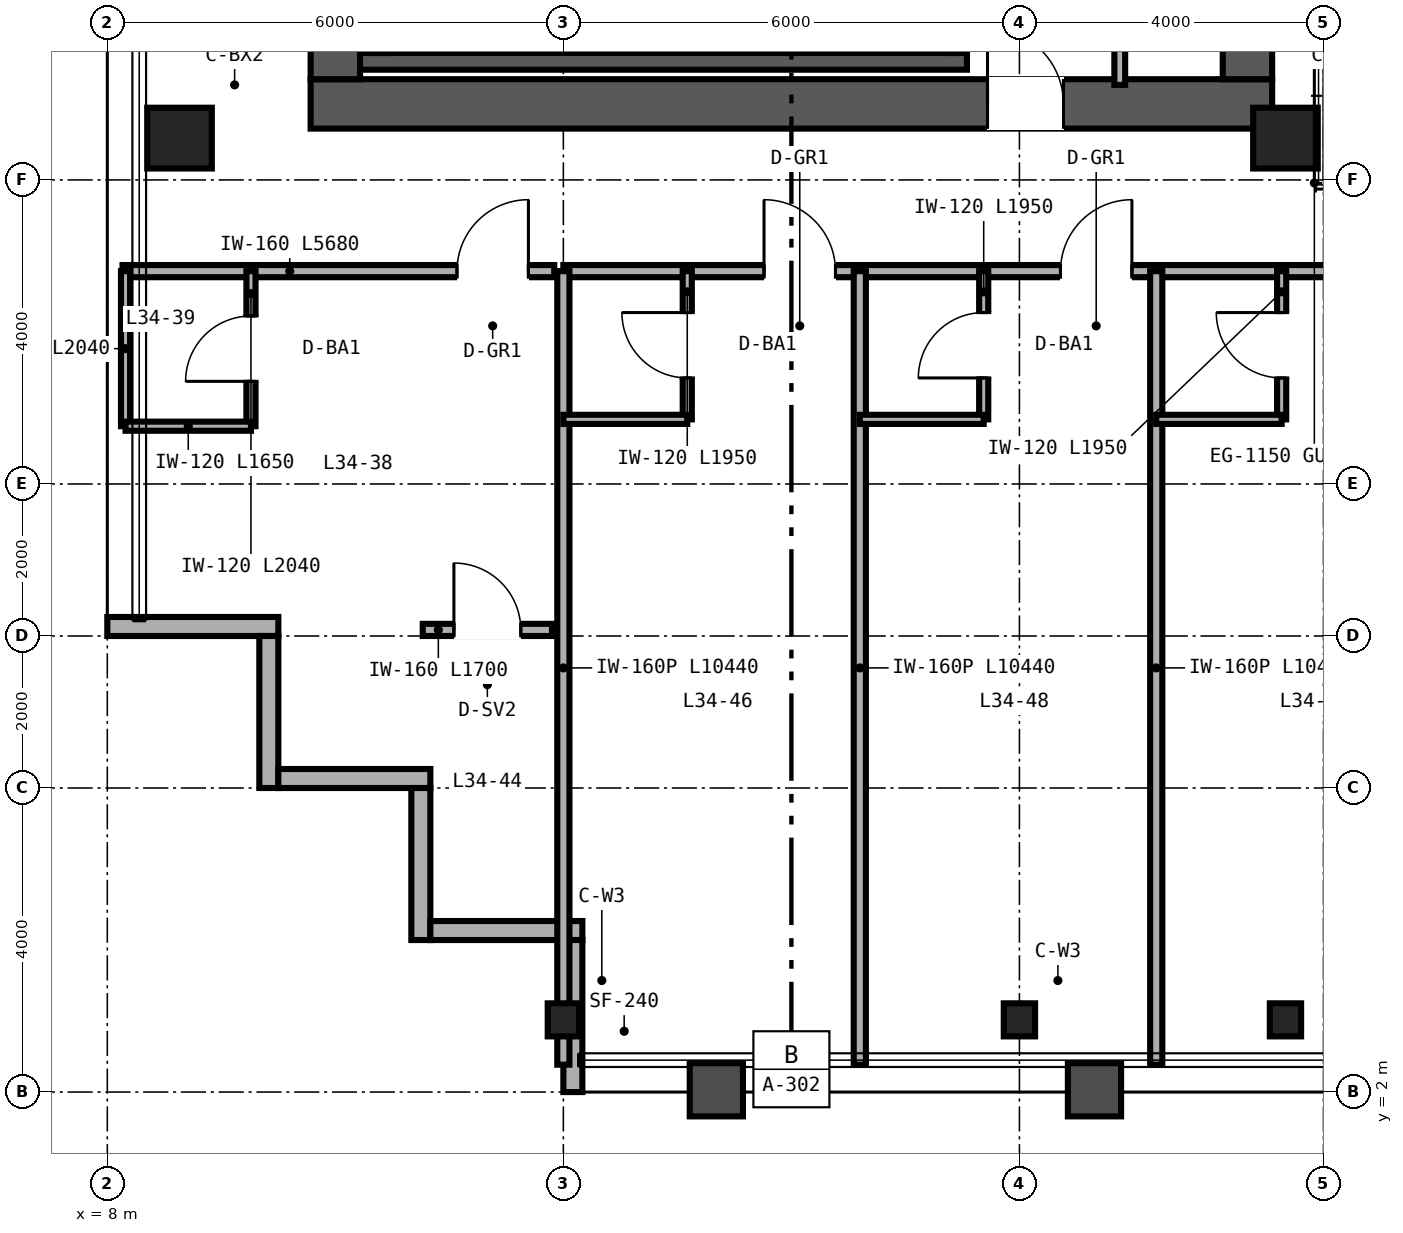
"""IFC4 building model, lengths in metres.
Left out: names, types, materials, properties, quantities, classifications, styles, units other than length and angle.
Written with IfcOpenShell. Run it as: python <this file> out.ifc"""

import sys

from ifc_helpers import new_model, si_unit, direction, frame, frame_2d, origin, origin_2d, place, context, subcontext, project, spatial, rectangle, hollow_rectangle, i_section, extrude, source, transform, mapped, element, fill, save


model = new_model("IFC4")
c1 = context("Model", 3, precision=1e-05, world=origin(), true_north=direction((0.0, 1.0)))
c2 = subcontext(c1, "Body", "Model", "MODEL_VIEW")
j1 = project(units=[si_unit("LENGTHUNIT", "METRE"), si_unit("PLANEANGLEUNIT", "RADIAN")], contexts=[c1])
p1 = place(None, origin())
s1 = spatial("IfcSite", under=j1, at=p1, CompositionType="ELEMENT")
p2 = place(p1, origin())
s2 = spatial("IfcBuilding", under=s1, at=p2, CompositionType="ELEMENT")
p3 = place(p2, frame((0.0, 0.0, 136.8)))
s3 = spatial("IfcBuildingStorey", under=s2, at=p3, CompositionType="ELEMENT", Elevation=136.8)
p4 = place(p3, frame((10.675, 15.0, 0.0), z_axis=(0.0, 0.0, 1.0), x_axis=(1.0, 0.0, 0.0)))
e1 = element("IfcWall", 1, at=p4, inside=s3, PredefinedType="SHEAR", context=c2, shape_type="SweptSolid", body=[
    extrude(rectangle(XDim=12.65, YDim=0.65, at=frame_2d((6.325, 0.0))), origin(), (0.0, 0.0, 1.0), 3.36),
])
p5 = place(p4, frame((8.905, 0.0, 0.0)))
e2 = element("IfcOpeningElement", 2, at=p5, cuts=e1, PredefinedType="OPENING", context=c2, shape_type="SweptSolid", body=[
    extrude(rectangle(XDim=1.0, YDim=2.15, at=frame_2d((0.5, 1.075))), frame((0.0, 0.335, 0.0), z_axis=(0.0, -1.0, 0.0), x_axis=(1.0, 0.0, 0.0)), (0.0, 0.0, 1.0), 0.67),
])
for number, where, z_axis, x_axis in (
    (3, (11.0, 15.325, 0.0), (0.0, 0.0, 1.0), (0.0, 1.0, 0.0)),
    (4, (23.0, 15.325, 0.0), (0.0, 0.0, 1.0), (0.0, 1.0, 0.0)),
):
    element("IfcWall", number, at=place(p3, frame(where, z_axis=z_axis, x_axis=x_axis)), inside=s3, PredefinedType="SHEAR", context=c2, shape_type="SweptSolid", body=[
        extrude(rectangle(XDim=21.35, YDim=0.65, at=frame_2d((10.675, 0.0))), origin(), (0.0, 0.0, 1.0), 3.36),
    ])
p6 = place(p3, frame((11.325, 15.56, 0.0), z_axis=(0.0, 0.0, 1.0), x_axis=(1.0, 0.0, 0.0)))
e5 = element("IfcWall", 5, at=p6, inside=s3, PredefinedType="SHEAR", context=c2, shape_type="SweptSolid", body=[
    extrude(rectangle(XDim=7.985, YDim=0.22, at=frame_2d((3.993, 0.0))), origin(), (0.0, 0.0, 1.0), 3.4),
])
for number, where, z_axis, x_axis in (
    (6, (11.56, 15.67, 0.0), (0.0, 0.0, 1.0), (0.0, 1.0, 0.0)),
    (7, (19.2, 15.67, 0.0), (0.0, 0.0, 1.0), (0.0, 1.0, 0.0)),
):
    element("IfcWall", number, at=place(p3, frame(where, z_axis=z_axis, x_axis=x_axis)), inside=s3, PredefinedType="SHEAR", context=c2, shape_type="SweptSolid", body=[
        extrude(rectangle(XDim=3.28, YDim=0.22, at=frame_2d((1.64, 0.0))), origin(), (0.0, 0.0, 1.0), 3.4),
    ])
m1 = source(origin(), c2, "Body", "SweptSolid", [
    extrude(hollow_rectangle(XDim=0.85, YDim=0.8, WallThickness=0.032, at=origin_2d()), origin(), (0.0, 0.0, 1.0), 3.36),
])
for number, where, z_axis, x_axis in (
    (8, (8.95, 14.55, 0.0), (0.0, 0.0, 1.0), (1.0, 0.0, 0.0)),
    (9, (23.5, 14.55, 0.0), (0.0, 0.0, 1.0), (1.0, 0.0, 0.0)),
):
    element("IfcColumn", number, at=place(p3, frame(where, z_axis=z_axis, x_axis=x_axis)), inside=s3, PredefinedType="COLUMN", context=c2, shape_type="MappedRepresentation", body=[
        mapped(m1, transform((0.0, 0.0, 0.0), scale=1.0)),
    ])
m2 = source(origin(), c2, "Body", "SweptSolid", [
    extrude(i_section(OverallWidth=0.412, OverallDepth=0.435, WebThickness=0.036, FlangeThickness=0.057, FilletRadius=0.025, at=origin_2d()), origin(), (0.0, 0.0, 1.0), 3.36),
])
for number, where, z_axis, x_axis in (
    (10, (14.0, 2.95, 0.0), (0.0, 0.0, 1.0), (1.0, 0.0, 0.0)),
    (11, (20.0, 2.95, 0.0), (0.0, 0.0, 1.0), (1.0, 0.0, 0.0)),
    (12, (23.5, 2.95, 0.0), (0.0, 0.0, 1.0), (1.0, 0.0, 0.0)),
):
    element("IfcColumn", number, at=place(p3, frame(where, z_axis=z_axis, x_axis=x_axis)), inside=s3, PredefinedType="COLUMN", context=c2, shape_type="MappedRepresentation", body=[
        mapped(m2, transform((0.0, 0.0, 0.0), scale=1.0)),
    ])
p7 = place(p3, frame((8.0, 8.125, 0.0), z_axis=(0.0, 0.0, 1.0), x_axis=(1.0, 0.0, 0.0)))
e13 = element("IfcWall", 13, at=p7, inside=s3, PredefinedType="SOLIDWALL", context=c2, shape_type="SweptSolid", body=[
    extrude(rectangle(XDim=2.25, YDim=0.25, at=frame_2d((1.125, 0.0))), origin(), (0.0, 0.0, 1.0), 3.36),
])
for number, where, z_axis, x_axis in (
    (14, (10.125, 8.0, 0.0), (0.0, 0.0, 1.0), (0.0, -1.0, 0.0)),
    (15, (10.25, 6.125, 0.0), (0.0, 0.0, 1.0), (1.0, 0.0, 0.0)),
    (16, (12.125, 6.0, 0.0), (0.0, 0.0, 1.0), (0.0, -1.0, 0.0)),
    (17, (12.25, 4.125, 0.0), (0.0, 0.0, 1.0), (1.0, 0.0, 0.0)),
):
    element("IfcWall", number, at=place(p3, frame(where, z_axis=z_axis, x_axis=x_axis)), inside=s3, PredefinedType="SOLIDWALL", context=c2, shape_type="SweptSolid", body=[
        extrude(rectangle(XDim=2.0, YDim=0.25, at=frame_2d((1.0, 0.0))), origin(), (0.0, 0.0, 1.0), 3.36),
    ])
p8 = place(p3, frame((14.125, 4.0, 0.0), z_axis=(0.0, 0.0, 1.0), x_axis=(0.0, -1.0, 0.0)))
e18 = element("IfcWall", 18, at=p8, inside=s3, PredefinedType="SOLIDWALL", context=c2, shape_type="SweptSolid", body=[
    extrude(rectangle(XDim=2.0, YDim=0.25, at=frame_2d((1.0, 0.0))), origin(), (0.0, 0.0, 1.0), 2.667),
])
p9 = place(p3, frame((21.32, 15.25, 0.0), z_axis=(0.0, 0.0, 1.0), x_axis=(0.0, 1.0, 0.0)))
e19 = element("IfcWall", 19, at=p9, inside=s3, PredefinedType="PARTITIONING", context=c2, shape_type="SweptSolid", body=[
    extrude(rectangle(XDim=3.59, YDim=0.142, at=frame_2d((1.795, 0.0))), origin(), (0.0, 0.0, 1.0), 3.36),
])
p10 = place(p9, frame((1.25, 0.0, 0.0)))
e20 = element("IfcOpeningElement", 20, at=p10, cuts=e19, PredefinedType="OPENING", context=c2, shape_type="SweptSolid", body=[
    extrude(rectangle(XDim=0.84, YDim=2.1, at=frame_2d((0.42, 1.05))), frame((0.0, 0.081, 0.0), z_axis=(0.0, -1.0, 0.0), x_axis=(1.0, 0.0, 0.0)), (0.0, 0.0, 1.0), 0.162),
])
p11 = place(p3, frame((8.2, 12.8, 0.0), z_axis=(0.0, 0.0, 1.0), x_axis=(1.0, 0.0, 0.0)))
e21 = element("IfcWall", 21, at=p11, inside=s3, PredefinedType="PARTITIONING", context=c2, shape_type="SweptSolid", body=[
    extrude(rectangle(XDim=5.68, YDim=0.16, at=frame_2d((2.84, 0.0))), origin(), (0.0, 0.0, 1.0), 3.36),
])
p12 = place(p11, frame((4.4, 0.0, 0.0)))
e22 = element("IfcOpeningElement", 22, at=p12, cuts=e21, PredefinedType="OPENING", context=c2, shape_type="SweptSolid", body=[
    extrude(rectangle(XDim=0.94, YDim=2.15, at=frame_2d((0.47, 1.075))), frame((0.0, 0.09, 0.0), z_axis=(0.0, -1.0, 0.0), x_axis=(1.0, 0.0, 0.0)), (0.0, 0.0, 1.0), 0.18),
])
p13 = place(p3, frame((9.89, 10.76, 0.0), z_axis=(0.0, 0.0, 1.0), x_axis=(0.0, 1.0, 0.0)))
e23 = element("IfcWall", 23, at=p13, inside=s3, PredefinedType="PARTITIONING", context=c2, shape_type="SweptSolid", body=[
    extrude(rectangle(XDim=2.04, YDim=0.12, at=frame_2d((1.02, 0.0))), origin(), (0.0, 0.0, 1.0), 3.36),
])
p14 = place(p13, frame((0.59, 0.0, 0.0)))
e24 = element("IfcOpeningElement", 24, at=p14, cuts=e23, PredefinedType="OPENING", context=c2, shape_type="SweptSolid", body=[
    extrude(rectangle(XDim=0.86, YDim=2.1, at=frame_2d((0.43, 1.05))), frame((0.0, 0.07, 0.0), z_axis=(0.0, -1.0, 0.0), x_axis=(1.0, 0.0, 0.0)), (0.0, 0.0, 1.0), 0.14),
])
p15 = place(p3, frame((8.24, 10.76, 0.0), z_axis=(0.0, 0.0, 1.0), x_axis=(0.0, 1.0, 0.0)))
e25 = element("IfcWall", 25, at=p15, inside=s3, PredefinedType="PARTITIONING", context=c2, shape_type="SweptSolid", body=[
    extrude(rectangle(XDim=2.04, YDim=0.12, at=frame_2d((1.02, 0.0))), origin(), (0.0, 0.0, 1.0), 3.36),
])
p16 = place(p3, frame((8.24, 10.76, 0.0), z_axis=(0.0, 0.0, 1.0), x_axis=(1.0, 0.0, 0.0)))
e26 = element("IfcWall", 26, at=p16, inside=s3, PredefinedType="PARTITIONING", context=c2, shape_type="SweptSolid", body=[
    extrude(rectangle(XDim=1.65, YDim=0.12, at=frame_2d((0.825, 0.0))), origin(), (0.0, 0.0, 1.0), 3.36),
])
p17 = place(p3, frame((12.15, 8.08, 0.0), z_axis=(0.0, 0.0, 1.0), x_axis=(1.0, 0.0, 0.0)))
e27 = element("IfcWall", 27, at=p17, inside=s3, PredefinedType="PARTITIONING", context=c2, shape_type="SweptSolid", body=[
    extrude(rectangle(XDim=1.7, YDim=0.16, at=frame_2d((0.85, 0.0))), origin(), (0.0, 0.0, 1.0), 3.36),
])
p18 = place(p17, frame((0.41, 0.0, 0.0)))
e28 = element("IfcOpeningElement", 28, at=p18, cuts=e27, PredefinedType="OPENING", context=c2, shape_type="SweptSolid", body=[
    extrude(rectangle(XDim=0.88, YDim=2.15, at=frame_2d((0.44, 1.075))), frame((0.0, 0.09, 0.0), z_axis=(0.0, -1.0, 0.0), x_axis=(1.0, 0.0, 0.0)), (0.0, 0.0, 1.0), 0.18),
])
p19 = place(p3, frame((14.0, 12.8, 0.0), z_axis=(0.0, 0.0, 1.0), x_axis=(1.0, 0.0, 0.0)))
e29 = element("IfcWall", 29, at=p19, inside=s3, PredefinedType="PARTITIONING", context=c2, shape_type="SweptSolid", body=[
    extrude(rectangle(XDim=36.0, YDim=0.16, at=frame_2d((18.0, 0.0))), origin(), (0.0, 0.0, 1.0), 2.581),
])
p20 = place(p19, frame((2.64, 0.0, 0.0)))
e30 = element("IfcOpeningElement", 30, at=p20, cuts=e29, PredefinedType="OPENING", context=c2, shape_type="SweptSolid", body=[
    extrude(rectangle(XDim=0.94, YDim=2.15, at=frame_2d((0.47, 1.075))), frame((0.0, 0.09, 0.0), z_axis=(0.0, -1.0, 0.0), x_axis=(1.0, 0.0, 0.0)), (0.0, 0.0, 1.0), 0.18),
])
p21 = place(p19, frame((6.54, 0.0, 0.0)))
e31 = element("IfcOpeningElement", 31, at=p21, cuts=e29, PredefinedType="OPENING", context=c2, shape_type="SweptSolid", body=[
    extrude(rectangle(XDim=0.94, YDim=2.15, at=frame_2d((0.47, 1.075))), frame((0.0, 0.09, 0.0), z_axis=(0.0, -1.0, 0.0), x_axis=(1.0, 0.0, 0.0)), (0.0, 0.0, 1.0), 0.18),
])
p22 = place(p19, frame((10.54, 0.0, 0.0)))
e32 = element("IfcOpeningElement", 32, at=p22, cuts=e29, PredefinedType="OPENING", context=c2, shape_type="SweptSolid", body=[
    extrude(rectangle(XDim=0.94, YDim=2.15, at=frame_2d((0.47, 1.075))), frame((0.0, 0.09, 0.0), z_axis=(0.0, -1.0, 0.0), x_axis=(1.0, 0.0, 0.0)), (0.0, 0.0, 1.0), 0.18),
])
p23 = place(p19, frame((14.54, 0.0, 0.0)))
e33 = element("IfcOpeningElement", 33, at=p23, cuts=e29, PredefinedType="OPENING", context=c2, shape_type="SweptSolid", body=[
    extrude(rectangle(XDim=0.94, YDim=2.15, at=frame_2d((0.47, 1.075))), frame((0.0, 0.09, 0.0), z_axis=(0.0, -1.0, 0.0), x_axis=(1.0, 0.0, 0.0)), (0.0, 0.0, 1.0), 0.18),
])
p24 = place(p19, frame((18.54, 0.0, 0.0)))
e34 = element("IfcOpeningElement", 34, at=p24, cuts=e29, PredefinedType="OPENING", context=c2, shape_type="SweptSolid", body=[
    extrude(rectangle(XDim=0.94, YDim=2.15, at=frame_2d((0.47, 1.075))), frame((0.0, 0.09, 0.0), z_axis=(0.0, -1.0, 0.0), x_axis=(1.0, 0.0, 0.0)), (0.0, 0.0, 1.0), 0.18),
])
p25 = place(p19, frame((22.54, 0.0, 0.0)))
e35 = element("IfcOpeningElement", 35, at=p25, cuts=e29, PredefinedType="OPENING", context=c2, shape_type="SweptSolid", body=[
    extrude(rectangle(XDim=0.94, YDim=2.15, at=frame_2d((0.47, 1.075))), frame((0.0, 0.09, 0.0), z_axis=(0.0, -1.0, 0.0), x_axis=(1.0, 0.0, 0.0)), (0.0, 0.0, 1.0), 0.18),
])
p26 = place(p19, frame((26.54, 0.0, 0.0)))
e36 = element("IfcOpeningElement", 36, at=p26, cuts=e29, PredefinedType="OPENING", context=c2, shape_type="SweptSolid", body=[
    extrude(rectangle(XDim=0.94, YDim=2.15, at=frame_2d((0.47, 1.075))), frame((0.0, 0.09, 0.0), z_axis=(0.0, -1.0, 0.0), x_axis=(1.0, 0.0, 0.0)), (0.0, 0.0, 1.0), 0.18),
])
p27 = place(p19, frame((30.64, 0.0, 0.0)))
e37 = element("IfcOpeningElement", 37, at=p27, cuts=e29, PredefinedType="OPENING", context=c2, shape_type="SweptSolid", body=[
    extrude(rectangle(XDim=0.94, YDim=2.15, at=frame_2d((0.47, 1.075))), frame((0.0, 0.09, 0.0), z_axis=(0.0, -1.0, 0.0), x_axis=(1.0, 0.0, 0.0)), (0.0, 0.0, 1.0), 0.18),
])
p28 = place(p19, frame((34.74, 0.0, 0.0)))
e38 = element("IfcOpeningElement", 38, at=p28, cuts=e29, PredefinedType="OPENING", context=c2, shape_type="SweptSolid", body=[
    extrude(rectangle(XDim=0.94, YDim=2.15, at=frame_2d((0.47, 1.075))), frame((0.0, 0.09, 0.0), z_axis=(0.0, -1.0, 0.0), x_axis=(1.0, 0.0, 0.0)), (0.0, 0.0, 1.0), 0.18),
])
for number, where, z_axis, x_axis in (
    (39, (14.0, 2.36, 0.0), (0.0, 0.0, 1.0), (0.0, 1.0, 0.0)),
    (40, (17.9, 2.36, 0.0), (0.0, 0.0, 1.0), (0.0, 1.0, 0.0)),
):
    element("IfcWall", number, at=place(p3, frame(where, z_axis=z_axis, x_axis=x_axis)), inside=s3, PredefinedType="PARTITIONING", context=c2, shape_type="SweptSolid", body=[
        extrude(rectangle(XDim=10.44, YDim=0.16, at=frame_2d((5.22, 0.0))), origin(), (0.0, 0.0, 1.0), 2.667),
    ])
p29 = place(p3, frame((15.63, 10.85, 0.0), z_axis=(0.0, 0.0, 1.0), x_axis=(0.0, 1.0, 0.0)))
e41 = element("IfcWall", 41, at=p29, inside=s3, PredefinedType="PARTITIONING", context=c2, shape_type="SweptSolid", body=[
    extrude(rectangle(XDim=1.95, YDim=0.12, at=frame_2d((0.975, 0.0))), origin(), (0.0, 0.0, 1.0), 3.36),
])
p30 = place(p29, frame((0.545, 0.0, 0.0)))
e42 = element("IfcOpeningElement", 42, at=p30, cuts=e41, PredefinedType="OPENING", context=c2, shape_type="SweptSolid", body=[
    extrude(rectangle(XDim=0.86, YDim=2.1, at=frame_2d((0.43, 1.05))), frame((0.0, 0.07, 0.0), z_axis=(0.0, -1.0, 0.0), x_axis=(1.0, 0.0, 0.0)), (0.0, 0.0, 1.0), 0.14),
])
p31 = place(p3, frame((14.0, 10.85, 0.0), z_axis=(0.0, 0.0, 1.0), x_axis=(1.0, 0.0, 0.0)))
e43 = element("IfcWall", 43, at=p31, inside=s3, PredefinedType="PARTITIONING", context=c2, shape_type="SweptSolid", body=[
    extrude(rectangle(XDim=1.63, YDim=0.12, at=frame_2d((0.815, 0.0))), origin(), (0.0, 0.0, 1.0), 3.36),
])
p32 = place(p3, frame((21.8, 2.36, 0.0), z_axis=(0.0, 0.0, 1.0), x_axis=(0.0, 1.0, 0.0)))
e44 = element("IfcWall", 44, at=p32, inside=s3, PredefinedType="PARTITIONING", context=c2, shape_type="SweptSolid", body=[
    extrude(rectangle(XDim=10.44, YDim=0.16, at=frame_2d((5.22, 0.0))), origin(), (0.0, 0.0, 1.0), 2.823),
])
p33 = place(p3, frame((19.53, 10.85, 0.0), z_axis=(0.0, 0.0, 1.0), x_axis=(0.0, 1.0, 0.0)))
e45 = element("IfcWall", 45, at=p33, inside=s3, PredefinedType="PARTITIONING", context=c2, shape_type="SweptSolid", body=[
    extrude(rectangle(XDim=1.95, YDim=0.12, at=frame_2d((0.975, 0.0))), origin(), (0.0, 0.0, 1.0), 3.36),
])
p34 = place(p33, frame((0.545, 0.0, 0.0)))
e46 = element("IfcOpeningElement", 46, at=p34, cuts=e45, PredefinedType="OPENING", context=c2, shape_type="SweptSolid", body=[
    extrude(rectangle(XDim=0.86, YDim=2.1, at=frame_2d((0.43, 1.05))), frame((0.0, 0.07, 0.0), z_axis=(0.0, -1.0, 0.0), x_axis=(1.0, 0.0, 0.0)), (0.0, 0.0, 1.0), 0.14),
])
p35 = place(p3, frame((17.9, 10.85, 0.0), z_axis=(0.0, 0.0, 1.0), x_axis=(1.0, 0.0, 0.0)))
e47 = element("IfcWall", 47, at=p35, inside=s3, PredefinedType="PARTITIONING", context=c2, shape_type="SweptSolid", body=[
    extrude(rectangle(XDim=1.63, YDim=0.12, at=frame_2d((0.815, 0.0))), origin(), (0.0, 0.0, 1.0), 3.36),
])
p36 = place(p3, frame((23.45, 10.85, 0.0), z_axis=(0.0, 0.0, 1.0), x_axis=(0.0, 1.0, 0.0)))
e48 = element("IfcWall", 48, at=p36, inside=s3, PredefinedType="PARTITIONING", context=c2, shape_type="SweptSolid", body=[
    extrude(rectangle(XDim=1.95, YDim=0.12, at=frame_2d((0.975, 0.0))), origin(), (0.0, 0.0, 1.0), 2.581),
])
p37 = place(p36, frame((0.545, 0.0, 0.0)))
e49 = element("IfcOpeningElement", 49, at=p37, cuts=e48, PredefinedType="OPENING", context=c2, shape_type="SweptSolid", body=[
    extrude(rectangle(XDim=0.86, YDim=2.1, at=frame_2d((0.43, 1.05))), frame((0.0, 0.07, 0.0), z_axis=(0.0, -1.0, 0.0), x_axis=(1.0, 0.0, 0.0)), (0.0, 0.0, 1.0), 0.14),
])
p38 = place(p3, frame((21.8, 10.85, 0.0), z_axis=(0.0, 0.0, 1.0), x_axis=(1.0, 0.0, 0.0)))
e50 = element("IfcWall", 50, at=p38, inside=s3, PredefinedType="PARTITIONING", context=c2, shape_type="SweptSolid", body=[
    extrude(rectangle(XDim=1.65, YDim=0.12, at=frame_2d((0.825, 0.0))), origin(), (0.0, 0.0, 1.0), 2.581),
])
m3 = source(origin(), c2, "Body", "SweptSolid", [
    extrude(rectangle(XDim=1.0, YDim=2.15, at=frame_2d((0.5, 1.075))), frame((0.0, 0.025, 0.0), z_axis=(0.0, -1.0, 0.0), x_axis=(1.0, 0.0, 0.0)), (0.0, 0.0, 1.0), 0.05),
])
p39 = place(p5, origin())
e51 = element("IfcDoor", 51, at=p39, inside=s3, OperationType="SINGLE_SWING_LEFT", PredefinedType="DOOR", context=c2, shape_type="MappedRepresentation", body=[
    mapped(m3, transform((0.0, 0.0, 0.0), scale=1.0)),
])
fill(e2, e51)
m4 = source(origin(), c2, "Body", "SweptSolid", [
    extrude(rectangle(XDim=0.86, YDim=2.1, at=frame_2d((0.43, 1.05))), frame((0.0, 0.025, 0.0), z_axis=(0.0, -1.0, 0.0), x_axis=(1.0, 0.0, 0.0)), (0.0, 0.0, 1.0), 0.05),
])
p40 = place(p14, origin())
e52 = element("IfcDoor", 52, at=p40, inside=s3, OperationType="SINGLE_SWING_LEFT", PredefinedType="DOOR", context=c2, shape_type="MappedRepresentation", body=[
    mapped(m4, transform((0.0, 0.0, 0.0), scale=1.0)),
])
fill(e24, e52)
m5 = source(origin(), c2, "Body", "SweptSolid", [
    extrude(rectangle(XDim=0.94, YDim=2.15, at=frame_2d((0.47, 1.075))), frame((0.0, 0.025, 0.0), z_axis=(0.0, -1.0, 0.0), x_axis=(1.0, 0.0, 0.0)), (0.0, 0.0, 1.0), 0.05),
])
p41 = place(p12, origin())
e53 = element("IfcDoor", 53, at=p41, inside=s3, OperationType="SINGLE_SWING_RIGHT", PredefinedType="DOOR", context=c2, shape_type="MappedRepresentation", body=[
    mapped(m5, transform((0.0, 0.0, 0.0), scale=1.0)),
])
fill(e22, e53)
m6 = source(origin(), c2, "Body", "SweptSolid", [
    extrude(rectangle(XDim=0.88, YDim=2.15, at=frame_2d((0.44, 1.075))), frame((0.0, 0.025, 0.0), z_axis=(0.0, -1.0, 0.0), x_axis=(1.0, 0.0, 0.0)), (0.0, 0.0, 1.0), 0.05),
])
p42 = place(p18, origin())
e54 = element("IfcDoor", 54, at=p42, inside=s3, OperationType="SINGLE_SWING_LEFT", PredefinedType="DOOR", context=c2, shape_type="MappedRepresentation", body=[
    mapped(m6, transform((0.0, 0.0, 0.0), scale=1.0)),
])
fill(e28, e54)
p43 = place(p30, origin())
e55 = element("IfcDoor", 55, at=p43, inside=s3, OperationType="SINGLE_SWING_RIGHT", PredefinedType="DOOR", context=c2, shape_type="MappedRepresentation", body=[
    mapped(m4, transform((0.0, 0.0, 0.0), scale=1.0)),
])
fill(e42, e55)
p44 = place(p34, origin())
e56 = element("IfcDoor", 56, at=p44, inside=s3, OperationType="SINGLE_SWING_LEFT", PredefinedType="DOOR", context=c2, shape_type="MappedRepresentation", body=[
    mapped(m4, transform((0.0, 0.0, 0.0), scale=1.0)),
])
fill(e46, e56)
p45 = place(p37, origin())
e57 = element("IfcDoor", 57, at=p45, inside=s3, OperationType="SINGLE_SWING_RIGHT", PredefinedType="DOOR", context=c2, shape_type="MappedRepresentation", body=[
    mapped(m4, transform((0.0, 0.0, 0.0), scale=1.0)),
])
fill(e49, e57)
p46 = place(p20, origin())
e58 = element("IfcDoor", 58, at=p46, inside=s3, OperationType="SINGLE_SWING_LEFT", PredefinedType="DOOR", context=c2, shape_type="MappedRepresentation", body=[
    mapped(m5, transform((0.0, 0.0, 0.0), scale=1.0)),
])
fill(e30, e58)
p47 = place(p21, origin())
e59 = element("IfcDoor", 59, at=p47, inside=s3, OperationType="SINGLE_SWING_RIGHT", PredefinedType="DOOR", context=c2, shape_type="MappedRepresentation", body=[
    mapped(m5, transform((0.0, 0.0, 0.0), scale=1.0)),
])
fill(e31, e59)
save(model, sys.argv[1])
